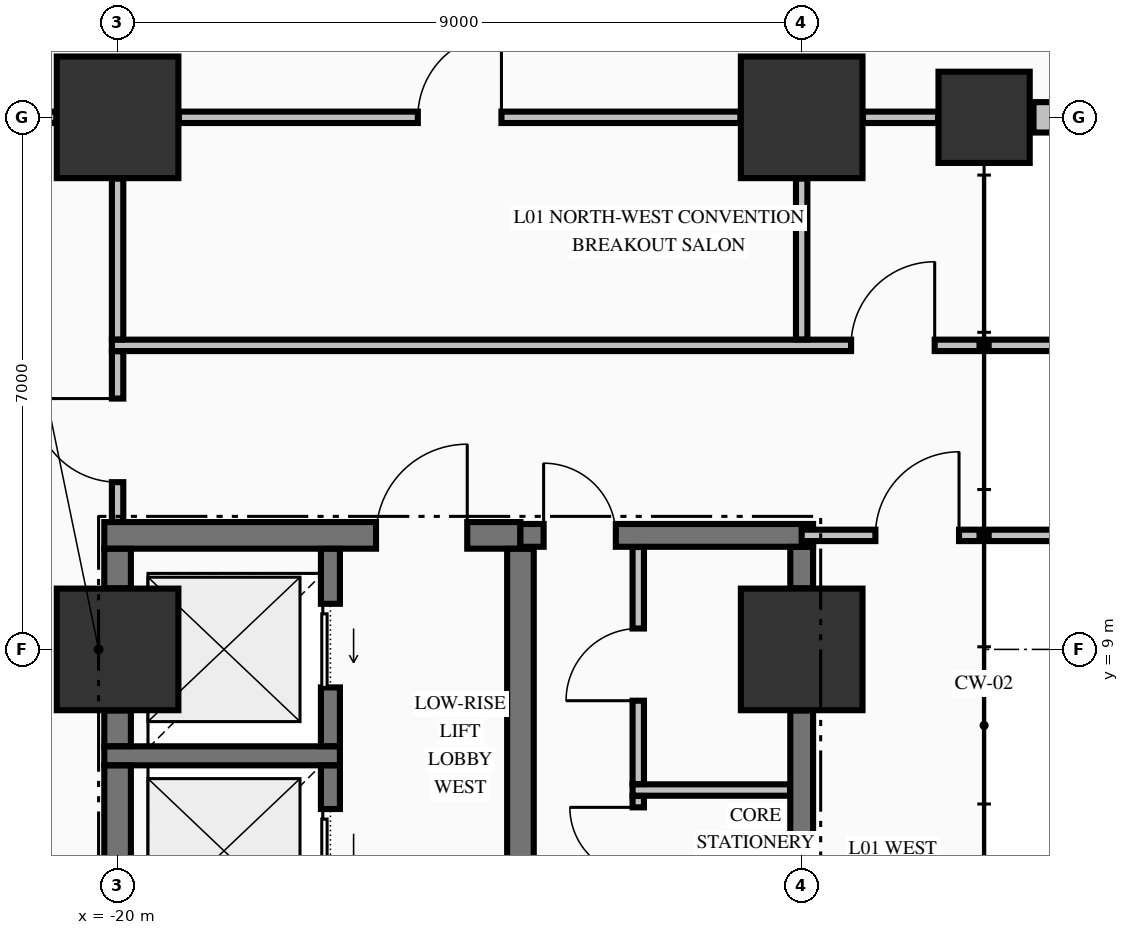
"""IFC4 building model, lengths in metres.
Left out: names, types, materials, properties, quantities, classifications, styles, units other than length and angle.
Written with IfcOpenShell. Run it as: python <this file> out.ifc"""

import sys

from ifc_helpers import new_model, si_unit, direction, frame, frame_2d, origin, origin_2d, place, context, subcontext, project, spatial, rectangle, extrude, element, fill, save


model = new_model("IFC4")
c1 = context("Model", 3, precision=1e-05, world=origin(), true_north=direction((0.0, 1.0)))
c2 = subcontext(c1, "Body", "Model", "MODEL_VIEW")
j1 = project(units=[si_unit("LENGTHUNIT", "METRE"), si_unit("PLANEANGLEUNIT", "RADIAN")], contexts=[c1])
p1 = place(None, origin())
s1 = spatial("IfcSite", under=j1, at=p1, CompositionType="ELEMENT")
p2 = place(p1, origin())
s2 = spatial("IfcBuilding", under=s1, at=p2, CompositionType="ELEMENT")
p3 = place(p2, frame((0.0, 0.0, 5.44)))
s3 = spatial("IfcBuildingStorey", under=s2, at=p3, CompositionType="ELEMENT", Elevation=5.44)
for number, where, z_axis, x_axis in (
    (1, (-20.0, 9.0, 0.0), (0.0, 0.0, 1.0), (1.0, 0.0, 0.0)),
    (2, (-20.0, 16.0, 0.0), (0.0, 0.0, 1.0), (1.0, 0.0, 0.0)),
    (3, (-11.0, 9.0, 0.0), (0.0, 0.0, 1.0), (1.0, 0.0, 0.0)),
    (4, (-11.0, 16.0, 0.0), (0.0, 0.0, 1.0), (1.0, 0.0, 0.0)),
):
    element("IfcColumn", number, at=place(p3, frame(where, z_axis=z_axis, x_axis=x_axis)), inside=s3, PredefinedType="COLUMN", context=c2, shape_type="SweptSolid", body=[
        extrude(rectangle(XDim=1.6, YDim=1.6, at=origin_2d()), origin(), (0.0, 0.0, 1.0), 5.09),
    ])
p4 = place(p3, frame((-8.6, 16.0, 0.0), z_axis=(0.0, 0.0, 1.0), x_axis=(1.0, 0.0, 0.0)))
e5 = element("IfcColumn", 5, at=p4, inside=s3, PredefinedType="COLUMN", context=c2, shape_type="SweptSolid", body=[
    extrude(rectangle(XDim=1.2, YDim=1.2, at=origin_2d()), origin(), (0.0, 0.0, 1.0), 5.09),
])
p5 = place(p3, frame((-7.95, 16.0, 0.0), z_axis=(0.0, 0.0, 1.0), x_axis=(1.0, 0.0, 0.0)))
e6 = element("IfcWall", 6, at=p5, inside=s3, PredefinedType="STANDARD", context=c2, shape_type="SweptSolid", body=[
    extrude(rectangle(XDim=7.22, YDim=0.4, at=frame_2d((3.61, 0.0))), origin(), (0.0, 0.0, 1.0), 4.132),
])
p6 = place(p3, frame((-20.175, 7.6, 0.0), z_axis=(0.0, 0.0, 1.0), x_axis=(1.0, 0.0, 0.0)))
e7 = element("IfcWall", 7, at=p6, inside=s3, PredefinedType="SOLIDWALL", context=c2, shape_type="SweptSolid", body=[
    extrude(rectangle(XDim=3.1, YDim=0.25, at=frame_2d((1.55, 0.0))), origin(), (0.0, 0.0, 1.0), 5.09),
])
p7 = place(p3, frame((-20.175, 10.5, 0.0), z_axis=(0.0, 0.0, 1.0), x_axis=(1.0, 0.0, 0.0)))
e8 = element("IfcWall", 8, at=p7, inside=s3, PredefinedType="SHEAR", context=c2, shape_type="SweptSolid", body=[
    extrude(rectangle(XDim=5.475, YDim=0.35, at=frame_2d((2.738, 0.0))), origin(), (0.0, 0.0, 1.0), 5.09),
])
p8 = place(p7, frame((3.575, 0.0, 0.0)))
e9 = element("IfcOpeningElement", 9, at=p8, cuts=e8, PredefinedType="OPENING", context=c2, shape_type="SweptSolid", body=[
    extrude(rectangle(XDim=1.2, YDim=2.15, at=frame_2d((0.6, 1.075))), frame((0.0, 0.185, 0.0), z_axis=(0.0, -1.0, 0.0), x_axis=(1.0, 0.0, 0.0)), (0.0, 0.0, 1.0), 0.37),
])
p9 = place(p3, frame((-14.7, 10.5, 0.0), z_axis=(0.0, 0.0, 1.0), x_axis=(1.0, 0.0, 0.0)))
e10 = element("IfcWall", 10, at=p9, inside=s3, PredefinedType="SHEAR", context=c2, shape_type="SweptSolid", body=[
    extrude(rectangle(XDim=3.85, YDim=0.3, at=frame_2d((1.925, 0.0))), origin(), (0.0, 0.0, 1.0), 5.09),
])
p10 = place(p9, frame((0.305, 0.0, 0.0)))
e11 = element("IfcOpeningElement", 11, at=p10, cuts=e10, PredefinedType="OPENING", context=c2, shape_type="SweptSolid", body=[
    extrude(rectangle(XDim=0.95, YDim=2.15, at=frame_2d((0.475, 1.075))), frame((0.0, 0.16, 0.0), z_axis=(0.0, -1.0, 0.0), x_axis=(1.0, 0.0, 0.0)), (0.0, 0.0, 1.0), 0.32),
])
p11 = place(p3, frame((-13.225, 7.15, 0.0), z_axis=(0.0, 0.0, 1.0), x_axis=(1.0, 0.0, 0.0)))
e12 = element("IfcWall", 12, at=p11, inside=s3, PredefinedType="PARTITIONING", context=c2, shape_type="SweptSolid", body=[
    extrude(rectangle(XDim=2.072, YDim=0.15, at=frame_2d((1.036, 0.0))), origin(), (0.0, 0.0, 1.0), 5.09),
])
p12 = place(p3, frame((-11.0, 10.5, 0.0), z_axis=(0.0, 0.0, 1.0), x_axis=(1.0, 0.0, 0.0)))
e13 = element("IfcWall", 13, at=p12, inside=s3, PredefinedType="PARTITIONING", context=c2, shape_type="SweptSolid", body=[
    extrude(rectangle(XDim=2.34, YDim=0.15, at=frame_2d((1.17, 0.0))), origin(), (0.0, 0.0, 1.0), 5.09),
])
p13 = place(p12, frame((0.97, 0.0, 0.0)))
e14 = element("IfcOpeningElement", 14, at=p13, cuts=e13, PredefinedType="OPENING", context=c2, shape_type="SweptSolid", body=[
    extrude(rectangle(XDim=1.1, YDim=2.15, at=frame_2d((0.55, 1.075))), frame((0.0, 0.085, 0.0), z_axis=(0.0, -1.0, 0.0), x_axis=(1.0, 0.0, 0.0)), (0.0, 0.0, 1.0), 0.17),
])
p14 = place(p3, frame((-8.54, 10.5, 0.0), z_axis=(0.0, 0.0, 1.0), x_axis=(1.0, 0.0, 0.0)))
e15 = element("IfcWall", 15, at=p14, inside=s3, PredefinedType="PARTITIONING", context=c2, shape_type="SweptSolid", body=[
    extrude(rectangle(XDim=17.08, YDim=0.15, at=frame_2d((8.54, 0.0))), origin(), (0.0, 0.0, 1.0), 5.09),
])
p15 = place(p3, frame((-20.075, 13.0, 0.0), z_axis=(0.0, 0.0, 1.0), x_axis=(1.0, 0.0, 0.0)))
e16 = element("IfcWall", 16, at=p15, inside=s3, PredefinedType="PARTITIONING", context=c2, shape_type="SweptSolid", body=[
    extrude(rectangle(XDim=11.415, YDim=0.15, at=frame_2d((5.708, 0.0))), origin(), (0.0, 0.0, 1.0), 5.09),
])
p16 = place(p15, frame((9.725, 0.0, 0.0)))
e17 = element("IfcOpeningElement", 17, at=p16, cuts=e16, PredefinedType="OPENING", context=c2, shape_type="SweptSolid", body=[
    extrude(rectangle(XDim=1.1, YDim=2.15, at=frame_2d((0.55, 1.075))), frame((0.0, 0.085, 0.0), z_axis=(0.0, -1.0, 0.0), x_axis=(1.0, 0.0, 0.0)), (0.0, 0.0, 1.0), 0.17),
])
p17 = place(p3, frame((-8.54, 13.0, 0.0), z_axis=(0.0, 0.0, 1.0), x_axis=(1.0, 0.0, 0.0)))
e18 = element("IfcWall", 18, at=p17, inside=s3, PredefinedType="PARTITIONING", context=c2, shape_type="SweptSolid", body=[
    extrude(rectangle(XDim=17.08, YDim=0.15, at=frame_2d((8.54, 0.0))), origin(), (0.0, 0.0, 1.0), 5.09),
])
p18 = place(p3, frame((-25.294, 16.0, 0.0), z_axis=(0.0, 0.0, 1.0), x_axis=(1.0, 0.0, 0.0)))
e19 = element("IfcWall", 19, at=p18, inside=s3, PredefinedType="PARTITIONING", context=c2, shape_type="SweptSolid", body=[
    extrude(rectangle(XDim=4.488, YDim=0.15, at=frame_2d((2.244, 0.0))), origin(), (0.0, 0.0, 1.0), 4.132),
])
p19 = place(p18, frame((3.238, 0.0, 0.0)))
e20 = element("IfcOpeningElement", 20, at=p19, cuts=e19, PredefinedType="OPENING", context=c2, shape_type="SweptSolid", body=[
    extrude(rectangle(XDim=1.1, YDim=2.15, at=frame_2d((0.55, 1.075))), frame((0.0, 0.085, 0.0), z_axis=(0.0, -1.0, 0.0), x_axis=(1.0, 0.0, 0.0)), (0.0, 0.0, 1.0), 0.17),
])
p20 = place(p3, frame((-19.194, 16.0, 0.0), z_axis=(0.0, 0.0, 1.0), x_axis=(1.0, 0.0, 0.0)))
e21 = element("IfcWall", 21, at=p20, inside=s3, PredefinedType="PARTITIONING", context=c2, shape_type="SweptSolid", body=[
    extrude(rectangle(XDim=7.388, YDim=0.15, at=frame_2d((3.694, 0.0))), origin(), (0.0, 0.0, 1.0), 4.132),
])
p21 = place(p20, frame((3.144, 0.0, 0.0)))
e22 = element("IfcOpeningElement", 22, at=p21, cuts=e21, PredefinedType="OPENING", context=c2, shape_type="SweptSolid", body=[
    extrude(rectangle(XDim=1.1, YDim=2.15, at=frame_2d((0.55, 1.075))), frame((0.0, 0.085, 0.0), z_axis=(0.0, -1.0, 0.0), x_axis=(1.0, 0.0, 0.0)), (0.0, 0.0, 1.0), 0.17),
])
p22 = place(p3, frame((-10.194, 16.0, 0.0), z_axis=(0.0, 0.0, 1.0), x_axis=(1.0, 0.0, 0.0)))
e23 = element("IfcWall", 23, at=p22, inside=s3, PredefinedType="PARTITIONING", context=c2, shape_type="SweptSolid", body=[
    extrude(rectangle(XDim=0.988, YDim=0.15, at=frame_2d((0.494, 0.0))), origin(), (0.0, 0.0, 1.0), 4.132),
])
p23 = place(p3, frame((-20.0, 5.227, 0.0), z_axis=(0.0, 0.0, 1.0), x_axis=(0.0, 1.0, 0.0)))
e24 = element("IfcWall", 24, at=p23, inside=s3, PredefinedType="SHEAR", context=c2, shape_type="SweptSolid", body=[
    extrude(rectangle(XDim=2.246, YDim=0.35, at=frame_2d((1.123, 0.0))), origin(), (0.0, 0.0, 1.0), 5.09),
])
p24 = place(p3, frame((-20.0, 7.727, 0.0), z_axis=(0.0, 0.0, 1.0), x_axis=(0.0, 1.0, 0.0)))
e25 = element("IfcWall", 25, at=p24, inside=s3, PredefinedType="SHEAR", context=c2, shape_type="SweptSolid", body=[
    extrude(rectangle(XDim=0.469, YDim=0.35, at=frame_2d((0.234, 0.0))), origin(), (0.0, 0.0, 1.0), 5.09),
])
p25 = place(p3, frame((-20.0, 9.804, 0.0), z_axis=(0.0, 0.0, 1.0), x_axis=(0.0, 1.0, 0.0)))
e26 = element("IfcWall", 26, at=p25, inside=s3, PredefinedType="SHEAR", context=c2, shape_type="SweptSolid", body=[
    extrude(rectangle(XDim=0.519, YDim=0.35, at=frame_2d((0.26, 0.0))), origin(), (0.0, 0.0, 1.0), 5.09),
])
p26 = place(p3, frame((-17.2, 5.227, 0.0), z_axis=(0.0, 0.0, 1.0), x_axis=(0.0, 1.0, 0.0)))
e27 = element("IfcWall", 27, at=p26, inside=s3, PredefinedType="SOLIDWALL", context=c2, shape_type="SweptSolid", body=[
    extrude(rectangle(XDim=2.246, YDim=0.25, at=frame_2d((1.123, 0.0))), origin(), (0.0, 0.0, 1.0), 5.09),
])
p27 = place(p26, frame((0.573, 0.0, 0.0)))
e28 = element("IfcOpeningElement", 28, at=p27, cuts=e27, PredefinedType="OPENING", context=c2, shape_type="SweptSolid", body=[
    extrude(rectangle(XDim=1.1, YDim=2.2, at=frame_2d((0.55, 1.1))), frame((0.0, 0.135, 0.0), z_axis=(0.0, -1.0, 0.0), x_axis=(1.0, 0.0, 0.0)), (0.0, 0.0, 1.0), 0.27),
])
p28 = place(p3, frame((-17.2, 7.727, 0.0), z_axis=(0.0, 0.0, 1.0), x_axis=(0.0, 1.0, 0.0)))
e29 = element("IfcWall", 29, at=p28, inside=s3, PredefinedType="SOLIDWALL", context=c2, shape_type="SweptSolid", body=[
    extrude(rectangle(XDim=2.596, YDim=0.25, at=frame_2d((1.298, 0.0))), origin(), (0.0, 0.0, 1.0), 5.09),
])
p29 = place(p28, frame((0.773, 0.0, 0.0)))
e30 = element("IfcOpeningElement", 30, at=p29, cuts=e29, PredefinedType="OPENING", context=c2, shape_type="SweptSolid", body=[
    extrude(rectangle(XDim=1.1, YDim=2.2, at=frame_2d((0.55, 1.1))), frame((0.0, 0.135, 0.0), z_axis=(0.0, -1.0, 0.0), x_axis=(1.0, 0.0, 0.0)), (0.0, 0.0, 1.0), 0.27),
])
p30 = place(p3, frame((-14.7, 5.852, 0.0), z_axis=(0.0, 0.0, 1.0), x_axis=(0.0, 1.0, 0.0)))
e31 = element("IfcWall", 31, at=p30, inside=s3, PredefinedType="SHEAR", context=c2, shape_type="SweptSolid", body=[
    extrude(rectangle(XDim=4.471, YDim=0.35, at=frame_2d((2.235, 0.0))), origin(), (0.0, 0.0, 1.0), 5.09),
])
p31 = place(p3, frame((-11.0, 5.852, 0.0), z_axis=(0.0, 0.0, 1.0), x_axis=(0.0, 1.0, 0.0)))
e32 = element("IfcWall", 32, at=p31, inside=s3, PredefinedType="SHEAR", context=c2, shape_type="SweptSolid", body=[
    extrude(rectangle(XDim=2.344, YDim=0.3, at=frame_2d((1.172, 0.0))), origin(), (0.0, 0.0, 1.0), 5.09),
])
p32 = place(p3, frame((-11.0, 9.804, 0.0), z_axis=(0.0, 0.0, 1.0), x_axis=(0.0, 1.0, 0.0)))
e33 = element("IfcWall", 33, at=p32, inside=s3, PredefinedType="SHEAR", context=c2, shape_type="SweptSolid", body=[
    extrude(rectangle(XDim=0.544, YDim=0.3, at=frame_2d((0.272, 0.0))), origin(), (0.0, 0.0, 1.0), 5.09),
])
p33 = place(p3, frame((-20.0, 10.678, 0.0), z_axis=(0.0, 0.0, 1.0), x_axis=(0.0, 1.0, 0.0)))
e34 = element("IfcWall", 34, at=p33, inside=s3, PredefinedType="PARTITIONING", context=c2, shape_type="SweptSolid", body=[
    extrude(rectangle(XDim=2.244, YDim=0.15, at=frame_2d((1.122, 0.0))), origin(), (0.0, 0.0, 1.0), 4.132),
])
p34 = place(p33, frame((0.522, 0.0, 0.0)))
e35 = element("IfcOpeningElement", 35, at=p34, cuts=e34, PredefinedType="OPENING", context=c2, shape_type="SweptSolid", body=[
    extrude(rectangle(XDim=1.1, YDim=2.15, at=frame_2d((0.55, 1.075))), frame((0.0, 0.085, 0.0), z_axis=(0.0, -1.0, 0.0), x_axis=(1.0, 0.0, 0.0)), (0.0, 0.0, 1.0), 0.17),
])
p35 = place(p3, frame((-20.0, 13.078, 0.0), z_axis=(0.0, 0.0, 1.0), x_axis=(0.0, 1.0, 0.0)))
e36 = element("IfcWall", 36, at=p35, inside=s3, PredefinedType="PARTITIONING", context=c2, shape_type="SweptSolid", body=[
    extrude(rectangle(XDim=2.116, YDim=0.15, at=frame_2d((1.058, 0.0))), origin(), (0.0, 0.0, 1.0), 4.132),
])
p36 = place(p3, frame((-13.15, 5.853, 0.0), z_axis=(0.0, 0.0, 1.0), x_axis=(0.0, 1.0, 0.0)))
e37 = element("IfcWall", 37, at=p36, inside=s3, PredefinedType="PARTITIONING", context=c2, shape_type="SweptSolid", body=[
    extrude(rectangle(XDim=1.219, YDim=0.15, at=frame_2d((0.609, 0.0))), origin(), (0.0, 0.0, 1.0), 5.09),
])
p37 = place(p36, frame((0.169, 0.0, 0.0)))
e38 = element("IfcOpeningElement", 38, at=p37, cuts=e37, PredefinedType="OPENING", context=c2, shape_type="SweptSolid", body=[
    extrude(rectangle(XDim=0.9, YDim=2.15, at=frame_2d((0.45, 1.075))), frame((0.0, 0.085, 0.0), z_axis=(0.0, -1.0, 0.0), x_axis=(1.0, 0.0, 0.0)), (0.0, 0.0, 1.0), 0.17),
])
p38 = place(p3, frame((-13.15, 7.228, 0.0), z_axis=(0.0, 0.0, 1.0), x_axis=(0.0, 1.0, 0.0)))
e39 = element("IfcWall", 39, at=p38, inside=s3, PredefinedType="PARTITIONING", context=c2, shape_type="SweptSolid", body=[
    extrude(rectangle(XDim=3.119, YDim=0.15, at=frame_2d((1.56, 0.0))), origin(), (0.0, 0.0, 1.0), 5.09),
])
p39 = place(p38, frame((1.097, 0.0, 0.0)))
e40 = element("IfcOpeningElement", 40, at=p39, cuts=e39, PredefinedType="OPENING", context=c2, shape_type="SweptSolid", body=[
    extrude(rectangle(XDim=0.95, YDim=2.15, at=frame_2d((0.475, 1.075))), frame((0.0, 0.085, 0.0), z_axis=(0.0, -1.0, 0.0), x_axis=(1.0, 0.0, 0.0)), (0.0, 0.0, 1.0), 0.17),
])
p40 = place(p3, frame((-11.0, 13.078, 0.0), z_axis=(0.0, 0.0, 1.0), x_axis=(0.0, 1.0, 0.0)))
e41 = element("IfcWall", 41, at=p40, inside=s3, PredefinedType="PARTITIONING", context=c2, shape_type="SweptSolid", body=[
    extrude(rectangle(XDim=2.116, YDim=0.15, at=frame_2d((1.058, 0.0))), origin(), (0.0, 0.0, 1.0), 4.132),
])
p41 = place(p10, origin())
e42 = element("IfcDoor", 42, at=p41, inside=s3, OperationType="SINGLE_SWING_LEFT", PredefinedType="DOOR", context=c2, shape_type="SweptSolid", body=[
    extrude(rectangle(XDim=0.95, YDim=2.15, at=frame_2d((0.475, 1.075))), frame((0.0, 0.025, 0.0), z_axis=(0.0, -1.0, 0.0), x_axis=(1.0, 0.0, 0.0)), (0.0, 0.0, 1.0), 0.05),
])
fill(e11, e42)
p42 = place(p37, origin())
e43 = element("IfcDoor", 43, at=p42, inside=s3, OperationType="SINGLE_SWING_RIGHT", PredefinedType="DOOR", context=c2, shape_type="SweptSolid", body=[
    extrude(rectangle(XDim=0.9, YDim=2.15, at=frame_2d((0.45, 1.075))), frame((0.0, 0.025, 0.0), z_axis=(0.0, -1.0, 0.0), x_axis=(1.0, 0.0, 0.0)), (0.0, 0.0, 1.0), 0.05),
])
fill(e38, e43)
p43 = place(p39, origin())
e44 = element("IfcDoor", 44, at=p43, inside=s3, OperationType="SINGLE_SWING_LEFT", PredefinedType="DOOR", context=c2, shape_type="SweptSolid", body=[
    extrude(rectangle(XDim=0.95, YDim=2.15, at=frame_2d((0.475, 1.075))), frame((0.0, 0.025, 0.0), z_axis=(0.0, -1.0, 0.0), x_axis=(1.0, 0.0, 0.0)), (0.0, 0.0, 1.0), 0.05),
])
fill(e40, e44)
p44 = place(p8, origin())
e45 = element("IfcDoor", 45, at=p44, inside=s3, OperationType="SINGLE_SWING_RIGHT", PredefinedType="DOOR", context=c2, shape_type="SweptSolid", body=[
    extrude(rectangle(XDim=1.2, YDim=2.15, at=frame_2d((0.6, 1.075))), frame((0.0, 0.025, 0.0), z_axis=(0.0, -1.0, 0.0), x_axis=(1.0, 0.0, 0.0)), (0.0, 0.0, 1.0), 0.05),
])
fill(e9, e45)
p45 = place(p27, origin())
e46 = element("IfcDoor", 46, at=p45, inside=s3, OperationType="SLIDING_TO_LEFT", PredefinedType="DOOR", context=c2, shape_type="SweptSolid", body=[
    extrude(rectangle(XDim=1.1, YDim=2.2, at=frame_2d((0.55, 1.1))), frame((0.0, 0.025, 0.0), z_axis=(0.0, -1.0, 0.0), x_axis=(1.0, 0.0, 0.0)), (0.0, 0.0, 1.0), 0.05),
])
fill(e28, e46)
p46 = place(p29, origin())
e47 = element("IfcDoor", 47, at=p46, inside=s3, OperationType="SLIDING_TO_LEFT", PredefinedType="DOOR", context=c2, shape_type="SweptSolid", body=[
    extrude(rectangle(XDim=1.1, YDim=2.2, at=frame_2d((0.55, 1.1))), frame((0.0, 0.025, 0.0), z_axis=(0.0, -1.0, 0.0), x_axis=(1.0, 0.0, 0.0)), (0.0, 0.0, 1.0), 0.05),
])
fill(e30, e47)
p47 = place(p21, origin())
e48 = element("IfcDoor", 48, at=p47, inside=s3, OperationType="SINGLE_SWING_RIGHT", PredefinedType="DOOR", context=c2, shape_type="SweptSolid", body=[
    extrude(rectangle(XDim=1.1, YDim=2.15, at=frame_2d((0.55, 1.075))), frame((0.0, 0.025, 0.0), z_axis=(0.0, -1.0, 0.0), x_axis=(1.0, 0.0, 0.0)), (0.0, 0.0, 1.0), 0.05),
])
fill(e22, e48)
p48 = place(p16, origin())
e49 = element("IfcDoor", 49, at=p48, inside=s3, OperationType="SINGLE_SWING_RIGHT", PredefinedType="DOOR", context=c2, shape_type="SweptSolid", body=[
    extrude(rectangle(XDim=1.1, YDim=2.15, at=frame_2d((0.55, 1.075))), frame((0.0, 0.025, 0.0), z_axis=(0.0, -1.0, 0.0), x_axis=(1.0, 0.0, 0.0)), (0.0, 0.0, 1.0), 0.05),
])
fill(e17, e49)
p49 = place(p13, origin())
e50 = element("IfcDoor", 50, at=p49, inside=s3, OperationType="SINGLE_SWING_RIGHT", PredefinedType="DOOR", context=c2, shape_type="SweptSolid", body=[
    extrude(rectangle(XDim=1.1, YDim=2.15, at=frame_2d((0.55, 1.075))), frame((0.0, 0.025, 0.0), z_axis=(0.0, -1.0, 0.0), x_axis=(1.0, 0.0, 0.0)), (0.0, 0.0, 1.0), 0.05),
])
fill(e14, e50)
p50 = place(p34, origin())
e51 = element("IfcDoor", 51, at=p50, inside=s3, OperationType="SINGLE_SWING_RIGHT", PredefinedType="DOOR", context=c2, shape_type="SweptSolid", body=[
    extrude(rectangle(XDim=1.1, YDim=2.15, at=frame_2d((0.55, 1.075))), frame((0.0, 0.025, 0.0), z_axis=(0.0, -1.0, 0.0), x_axis=(1.0, 0.0, 0.0)), (0.0, 0.0, 1.0), 0.05),
])
fill(e35, e51)
save(model, sys.argv[1])
